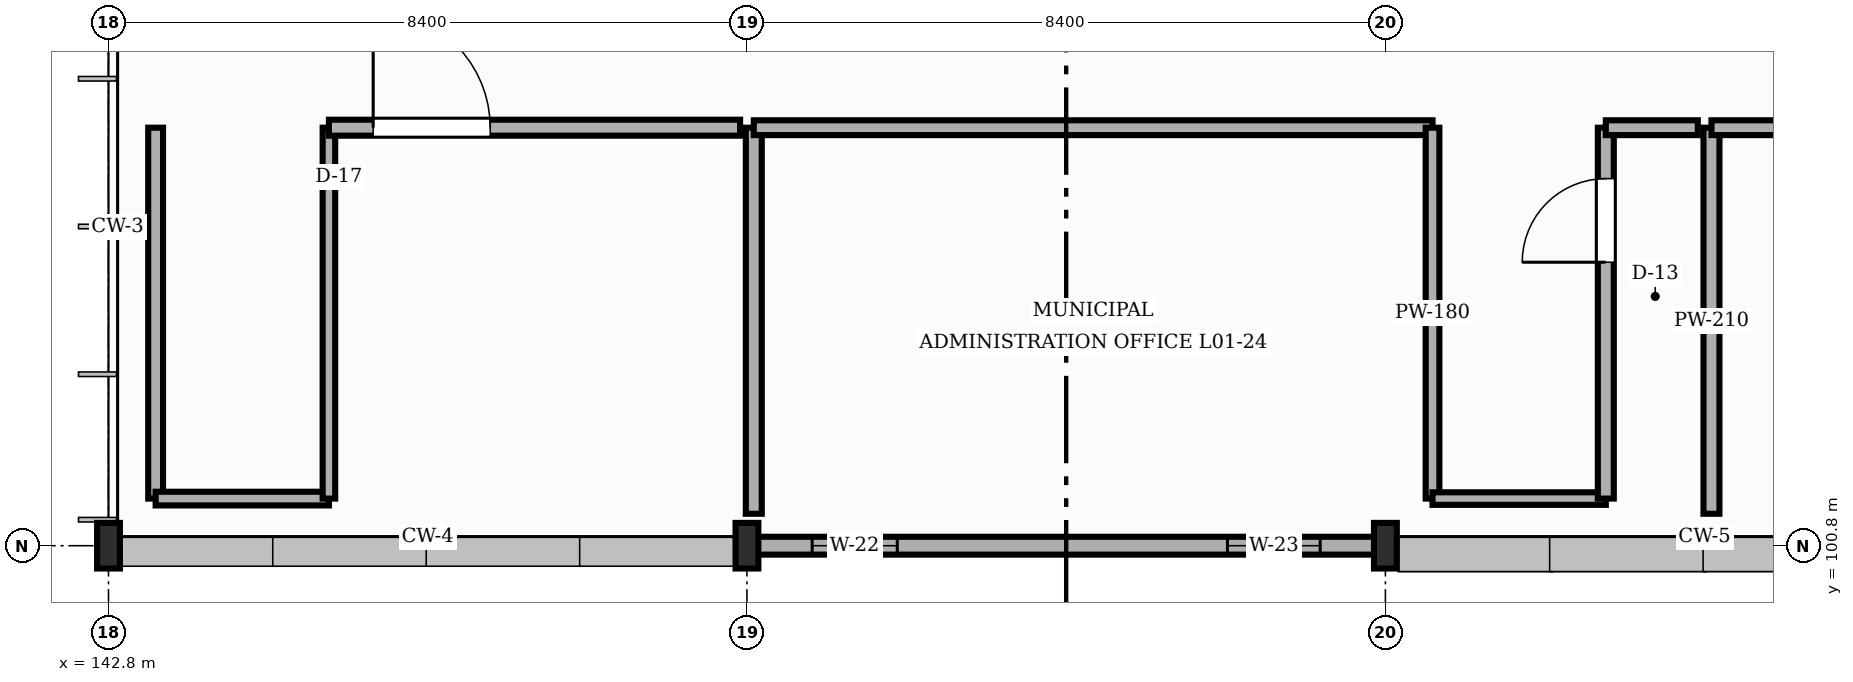
"""IFC4 building model, lengths in metres.
Left out: names, types, materials, properties, quantities, classifications, styles, units other than length and angle.
Written with IfcOpenShell. Run it as: python <this file> out.ifc"""

import sys

from ifc_helpers import new_model, si_unit, direction, frame, frame_2d, origin, origin_2d, place, context, subcontext, project, spatial, rectangle, i_section, extrude, element, fill, save


model = new_model("IFC4")
c1 = context("Model", 3, precision=1e-05, world=origin(), true_north=direction((0.0, 1.0)))
c2 = subcontext(c1, "Body", "Model", "MODEL_VIEW")
j1 = project(units=[si_unit("LENGTHUNIT", "METRE"), si_unit("PLANEANGLEUNIT", "RADIAN")], contexts=[c1])
p1 = place(None, origin())
s1 = spatial("IfcSite", under=j1, at=p1, CompositionType="ELEMENT")
p2 = place(p1, origin())
s2 = spatial("IfcBuilding", under=s1, at=p2, CompositionType="ELEMENT")
p3 = place(p2, frame((0.0, 0.0, 5.4)))
s3 = spatial("IfcBuildingStorey", under=s2, at=p3, CompositionType="ELEMENT", Elevation=5.4)
for number, where, z_axis, x_axis in (
    (1, (142.8, 100.8, 0.0), (0.0, 0.0, 1.0), (1.0, 0.0, 0.0)),
    (2, (151.2, 100.8, 0.0), (0.0, 0.0, 1.0), (1.0, 0.0, 0.0)),
    (3, (159.6, 100.8, 0.0), (0.0, 0.0, 1.0), (1.0, 0.0, 0.0)),
):
    element("IfcColumn", number, at=place(p3, frame(where, z_axis=z_axis, x_axis=x_axis)), inside=s3, PredefinedType="COLUMN", context=c2, shape_type="SweptSolid", body=[
        extrude(i_section(OverallWidth=0.3, OverallDepth=0.6, WebThickness=0.015, FlangeThickness=0.03, FilletRadius=0.027, at=origin_2d()), origin(), (0.0, 0.0, 1.0), 4.5),
    ])
p4 = place(p3, frame((151.208, 100.8, 0.0), z_axis=(0.0, 0.0, 1.0), x_axis=(1.0, 0.0, 0.0)))
e4 = element("IfcWall", 4, at=p4, inside=s3, PredefinedType="STANDARD", context=c2, shape_type="SweptSolid", body=[
    extrude(rectangle(XDim=8.384, YDim=0.235, at=frame_2d((4.192, 0.0))), origin(), (0.0, 0.0, 1.0), 3.922),
])
p5 = place(p4, frame((0.85, 0.0, 0.9)))
e5 = element("IfcOpeningElement", 5, at=p5, cuts=e4, PredefinedType="OPENING", context=c2, shape_type="SweptSolid", body=[
    extrude(rectangle(XDim=1.12, YDim=1.45, at=frame_2d((0.56, 0.725))), frame((0.0, 0.127, 0.0), z_axis=(0.0, -1.0, 0.0), x_axis=(1.0, 0.0, 0.0)), (0.0, 0.0, 1.0), 0.255),
])
p6 = place(p4, frame((6.314, 0.0, 0.9)))
e6 = element("IfcOpeningElement", 6, at=p6, cuts=e4, PredefinedType="OPENING", context=c2, shape_type="SweptSolid", body=[
    extrude(rectangle(XDim=1.22, YDim=1.45, at=frame_2d((0.61, 0.725))), frame((0.0, 0.127, 0.0), z_axis=(0.0, -1.0, 0.0), x_axis=(1.0, 0.0, 0.0)), (0.0, 0.0, 1.0), 0.255),
])
p7 = place(p3, frame((163.89, 101.22, -0.004), z_axis=(0.0, 0.0, 1.0), x_axis=(0.0, 1.0, 0.0)))
e7 = element("IfcWall", 7, at=p7, inside=s3, PredefinedType="STANDARD", context=c2, shape_type="SweptSolid", body=[
    extrude(rectangle(XDim=5.08, YDim=0.21, at=frame_2d((2.54, 0.0))), origin(), (0.0, 0.0, 1.0), 4.294),
])
p8 = place(p3, frame((163.89, 106.3, -0.004), z_axis=(0.0, 0.0, 1.0), x_axis=(1.0, 0.0, 0.0)))
e8 = element("IfcWall", 8, at=p8, inside=s3, PredefinedType="STANDARD", context=c2, shape_type="SweptSolid", body=[
    extrude(rectangle(XDim=5.14, YDim=0.195, at=frame_2d((2.57, 0.0))), origin(), (0.0, 0.0, 1.0), 4.294),
])
p9 = place(p3, frame((151.29, 101.22, -0.004), z_axis=(0.0, 0.0, 1.0), x_axis=(0.0, 1.0, 0.0)))
e9 = element("IfcWall", 9, at=p9, inside=s3, PredefinedType="STANDARD", context=c2, shape_type="SweptSolid", body=[
    extrude(rectangle(XDim=5.08, YDim=0.21, at=frame_2d((2.54, 0.0))), origin(), (0.0, 0.0, 1.0), 3.936),
])
p10 = place(p3, frame((151.29, 106.3, -0.004), z_axis=(0.0, 0.0, 1.0), x_axis=(1.0, 0.0, 0.0)))
e10 = element("IfcWall", 10, at=p10, inside=s3, PredefinedType="STANDARD", context=c2, shape_type="SweptSolid", body=[
    extrude(rectangle(XDim=8.93, YDim=0.195, at=frame_2d((4.465, 0.0))), origin(), (0.0, 0.0, 1.0), 4.294),
])
p11 = place(p3, frame((160.22, 106.3, -0.004), z_axis=(0.0, 0.0, 1.0), x_axis=(0.0, -1.0, 0.0)))
e11 = element("IfcWall", 11, at=p11, inside=s3, PredefinedType="STANDARD", context=c2, shape_type="SweptSolid", body=[
    extrude(rectangle(XDim=4.88, YDim=0.18, at=frame_2d((2.44, 0.0))), origin(), (0.0, 0.0, 1.0), 4.294),
])
p12 = place(p3, frame((160.22, 101.42, -0.004), z_axis=(0.0, 0.0, 1.0), x_axis=(1.0, 0.0, 0.0)))
e12 = element("IfcWall", 12, at=p12, inside=s3, PredefinedType="STANDARD", context=c2, shape_type="SweptSolid", body=[
    extrude(rectangle(XDim=2.28, YDim=0.165, at=frame_2d((1.14, 0.0))), origin(), (0.0, 0.0, 1.0), 4.294),
])
p13 = place(p3, frame((162.5, 101.42, -0.004), z_axis=(0.0, 0.0, 1.0), x_axis=(0.0, 1.0, 0.0)))
e13 = element("IfcWall", 13, at=p13, inside=s3, PredefinedType="STANDARD", context=c2, shape_type="SweptSolid", body=[
    extrude(rectangle(XDim=4.88, YDim=0.21, at=frame_2d((2.44, 0.0))), origin(), (0.0, 0.0, 1.0), 4.046),
])
p14 = place(p13, frame((3.11, 0.0, 0.0)))
e14 = element("IfcOpeningElement", 14, at=p14, cuts=e13, PredefinedType="OPENING", context=c2, shape_type="SweptSolid", body=[
    extrude(rectangle(XDim=1.1, YDim=2.14, at=frame_2d((0.55, 1.07))), frame((0.0, 0.115, 0.0), z_axis=(0.0, -1.0, 0.0), x_axis=(1.0, 0.0, 0.0)), (0.0, 0.0, 1.0), 0.23),
])
p15 = place(p3, frame((162.5, 106.3, -0.004), z_axis=(0.0, 0.0, 1.0), x_axis=(1.0, 0.0, 0.0)))
e15 = element("IfcWall", 15, at=p15, inside=s3, PredefinedType="STANDARD", context=c2, shape_type="SweptSolid", body=[
    extrude(rectangle(XDim=1.21, YDim=0.195, at=frame_2d((0.605, 0.0))), origin(), (0.0, 0.0, 1.0), 4.294),
])
p16 = place(p3, frame((143.42, 106.3, -0.004), z_axis=(0.0, 0.0, 1.0), x_axis=(0.0, -1.0, 0.0)))
e16 = element("IfcWall", 16, at=p16, inside=s3, PredefinedType="STANDARD", context=c2, shape_type="SweptSolid", body=[
    extrude(rectangle(XDim=4.88, YDim=0.195, at=frame_2d((2.44, 0.0))), origin(), (0.0, 0.0, 1.0), 4.294),
])
p17 = place(p3, frame((143.42, 101.42, -0.004), z_axis=(0.0, 0.0, 1.0), x_axis=(1.0, 0.0, 0.0)))
e17 = element("IfcWall", 17, at=p17, inside=s3, PredefinedType="STANDARD", context=c2, shape_type="SweptSolid", body=[
    extrude(rectangle(XDim=2.28, YDim=0.18, at=frame_2d((1.14, 0.0))), origin(), (0.0, 0.0, 1.0), 4.294),
])
p18 = place(p3, frame((145.7, 101.42, -0.004), z_axis=(0.0, 0.0, 1.0), x_axis=(0.0, 1.0, 0.0)))
e18 = element("IfcWall", 18, at=p18, inside=s3, PredefinedType="STANDARD", context=c2, shape_type="SweptSolid", body=[
    extrude(rectangle(XDim=4.88, YDim=0.165, at=frame_2d((2.44, 0.0))), origin(), (0.0, 0.0, 1.0), 3.986),
])
p19 = place(p3, frame((145.7, 106.3, -0.004), z_axis=(0.0, 0.0, 1.0), x_axis=(1.0, 0.0, 0.0)))
e19 = element("IfcWall", 19, at=p19, inside=s3, PredefinedType="STANDARD", context=c2, shape_type="SweptSolid", body=[
    extrude(rectangle(XDim=5.41, YDim=0.21, at=frame_2d((2.705, 0.0))), origin(), (0.0, 0.0, 1.0), 4.294),
])
p20 = place(p19, frame((0.583, 0.0, 0.0)))
e20 = element("IfcOpeningElement", 20, at=p20, cuts=e19, PredefinedType="OPENING", context=c2, shape_type="SweptSolid", body=[
    extrude(rectangle(XDim=1.54, YDim=2.14, at=frame_2d((0.77, 1.07))), frame((0.0, 0.115, 0.0), z_axis=(0.0, -1.0, 0.0), x_axis=(1.0, 0.0, 0.0)), (0.0, 0.0, 1.0), 0.23),
])
p21 = place(p5, origin())
e21 = element("IfcWindow", 21, at=p21, inside=s3, PartitioningType="SINGLE_PANEL", PredefinedType="WINDOW", context=c2, shape_type="SweptSolid", body=[
    extrude(rectangle(XDim=1.12, YDim=1.45, at=frame_2d((0.56, 0.725))), frame((0.0, 0.03, 0.0), z_axis=(0.0, -1.0, 0.0), x_axis=(1.0, 0.0, 0.0)), (0.0, 0.0, 1.0), 0.06),
])
fill(e5, e21)
p22 = place(p6, origin())
e22 = element("IfcWindow", 22, at=p22, inside=s3, PartitioningType="SINGLE_PANEL", PredefinedType="WINDOW", context=c2, shape_type="SweptSolid", body=[
    extrude(rectangle(XDim=1.22, YDim=1.45, at=frame_2d((0.61, 0.725))), frame((0.0, 0.03, 0.0), z_axis=(0.0, -1.0, 0.0), x_axis=(1.0, 0.0, 0.0)), (0.0, 0.0, 1.0), 0.06),
])
fill(e6, e22)
p23 = place(p14, origin())
e23 = element("IfcDoor", 23, at=p23, inside=s3, OperationType="SINGLE_SWING_LEFT", PredefinedType="DOOR", context=c2, shape_type="SweptSolid", body=[
    extrude(rectangle(XDim=1.1, YDim=2.14, at=frame_2d((0.55, 1.07))), frame((0.0, 0.025, 0.0), z_axis=(0.0, -1.0, 0.0), x_axis=(1.0, 0.0, 0.0)), (0.0, 0.0, 1.0), 0.05),
])
fill(e14, e23)
p24 = place(p20, origin())
e24 = element("IfcDoor", 24, at=p24, inside=s3, OperationType="SINGLE_SWING_LEFT", PredefinedType="DOOR", context=c2, shape_type="SweptSolid", body=[
    extrude(rectangle(XDim=1.54, YDim=2.14, at=frame_2d((0.77, 1.07))), frame((0.0, 0.025, 0.0), z_axis=(0.0, -1.0, 0.0), x_axis=(1.0, 0.0, 0.0)), (0.0, 0.0, 1.0), 0.05),
])
fill(e20, e24)
save(model, sys.argv[1])
